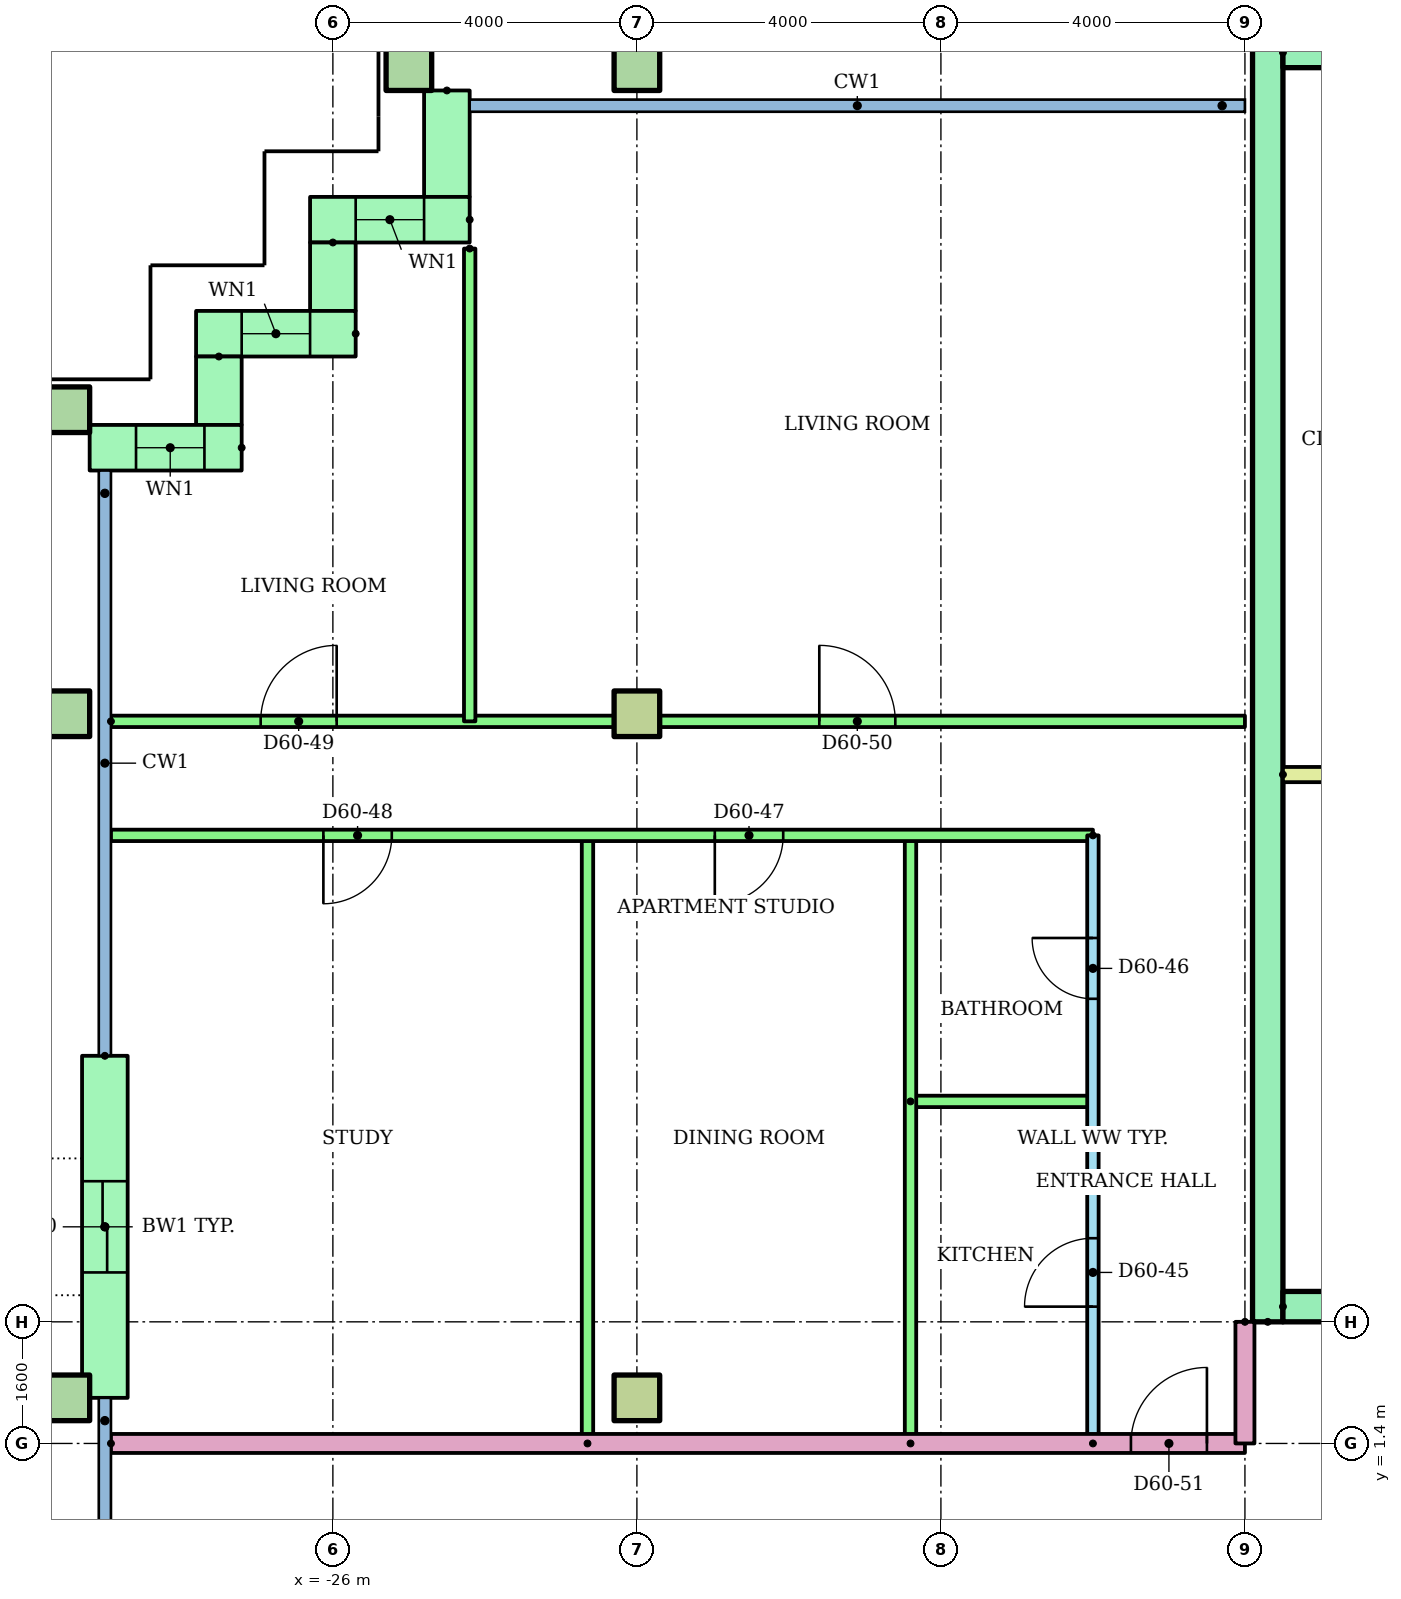
"""IFC4 building model, lengths in metres.
Left out: names, types, materials, properties, quantities, classifications, styles, units other than length and angle.
Written with IfcOpenShell. Run it as: python <this file> out.ifc"""

import sys

from ifc_helpers import new_model, si_unit, direction, frame, frame_2d, origin, origin_2d, place, context, subcontext, project, spatial, rectangle, hollow_rectangle, extrude, element, fill, save


model = new_model("IFC4")
c1 = context("Model", 3, precision=1e-05, world=origin(), true_north=direction((0.0, 1.0)))
c2 = subcontext(c1, "Body", "Model", "MODEL_VIEW")
j1 = project(units=[si_unit("LENGTHUNIT", "METRE"), si_unit("PLANEANGLEUNIT", "RADIAN")], contexts=[c1])
p1 = place(None, origin())
s1 = spatial("IfcSite", under=j1, at=p1, CompositionType="ELEMENT")
p2 = place(p1, origin())
s2 = spatial("IfcBuilding", under=s1, at=p2, CompositionType="ELEMENT")
p3 = place(p2, frame((0.0, 0.0, 230.0)))
s3 = spatial("IfcBuildingStorey", under=s2, at=p3, CompositionType="ELEMENT", Elevation=230.0)
p4 = place(p3, frame((-29.5, 2.0, 0.0)))
e1 = element("IfcColumn", 1, at=p4, inside=s3, PredefinedType="COLUMN", context=c2, shape_type="SweptSolid", body=[
    extrude(hollow_rectangle(XDim=0.6, YDim=0.6, WallThickness=0.03, at=origin_2d()), origin(), (0.0, 0.0, 1.0), 3.2),
])
p5 = place(p3, frame((-22.0, 2.0, 0.0)))
e2 = element("IfcColumn", 2, at=p5, inside=s3, PredefinedType="COLUMN", context=c2, shape_type="SweptSolid", body=[
    extrude(rectangle(XDim=0.6, YDim=0.6, at=origin_2d()), origin(), (0.0, 0.0, 1.0), 3.2),
])
p6 = place(p3, frame((-29.5, 11.0, 0.0)))
e3 = element("IfcColumn", 3, at=p6, inside=s3, PredefinedType="COLUMN", context=c2, shape_type="SweptSolid", body=[
    extrude(hollow_rectangle(XDim=0.6, YDim=0.6, WallThickness=0.03, at=origin_2d()), origin(), (0.0, 0.0, 1.0), 3.2),
])
p7 = place(p3, frame((-22.0, 11.0, 0.0)))
e4 = element("IfcColumn", 4, at=p7, inside=s3, PredefinedType="COLUMN", context=c2, shape_type="SweptSolid", body=[
    extrude(rectangle(XDim=0.6, YDim=0.6, at=origin_2d()), origin(), (0.0, 0.0, 1.0), 3.2),
])
for number, where in (
    (5, (-29.5, 15.0, 0.0)),
    (6, (-25.0, 19.5, 0.0)),
    (7, (-22.0, 19.5, 0.0)),
):
    element("IfcColumn", number, at=place(p3, frame(where)), inside=s3, PredefinedType="COLUMN", context=c2, shape_type="SweptSolid", body=[
        extrude(hollow_rectangle(XDim=0.6, YDim=0.6, WallThickness=0.03, at=origin_2d()), origin(), (0.0, 0.0, 1.0), 3.2),
    ])
p8 = place(p3, frame((-24.5, 19.2, 0.0), z_axis=(0.0, 0.0, 1.0), x_axis=(0.0, -1.0, 0.0)))
e8 = element("IfcWall", 8, at=p8, inside=s3, PredefinedType="STANDARD", context=c2, shape_type="SweptSolid", body=[
    extrude(rectangle(XDim=1.4, YDim=0.6, at=frame_2d((0.7, 0.0))), origin(), (0.0, 0.0, 1.0), 2.92),
])
p9 = place(p3, frame((-24.2, 17.5, 0.0), z_axis=(0.0, 0.0, 1.0), x_axis=(-1.0, 0.0, 0.0)))
e9 = element("IfcWall", 9, at=p9, inside=s3, PredefinedType="STANDARD", context=c2, shape_type="SweptSolid", body=[
    extrude(rectangle(XDim=2.1, YDim=0.6, at=frame_2d((1.05, 0.0))), origin(), (0.0, 0.0, 1.0), 2.92),
])
p10 = place(p9, frame((0.6, 0.0, 0.9)))
e10 = element("IfcOpeningElement", 10, at=p10, cuts=e9, PredefinedType="OPENING", context=c2, shape_type="SweptSolid", body=[
    extrude(rectangle(XDim=0.9, YDim=1.5, at=frame_2d((0.45, 0.75))), frame((0.0, 0.31, 0.0), z_axis=(0.0, -1.0, 0.0), x_axis=(1.0, 0.0, 0.0)), (0.0, 0.0, 1.0), 0.62),
])
p11 = place(p3, frame((-26.0, 17.2, 0.0), z_axis=(0.0, 0.0, 1.0), x_axis=(0.0, -1.0, 0.0)))
e11 = element("IfcWall", 11, at=p11, inside=s3, PredefinedType="STANDARD", context=c2, shape_type="SweptSolid", body=[
    extrude(rectangle(XDim=0.9, YDim=0.6, at=frame_2d((0.45, 0.0))), origin(), (0.0, 0.0, 1.0), 2.92),
])
p12 = place(p3, frame((-25.7, 16.0, 0.0), z_axis=(0.0, 0.0, 1.0), x_axis=(-1.0, 0.0, 0.0)))
e12 = element("IfcWall", 12, at=p12, inside=s3, PredefinedType="STANDARD", context=c2, shape_type="SweptSolid", body=[
    extrude(rectangle(XDim=2.1, YDim=0.6, at=frame_2d((1.05, 0.0))), origin(), (0.0, 0.0, 1.0), 2.92),
])
p13 = place(p12, frame((0.6, 0.0, 0.9)))
e13 = element("IfcOpeningElement", 13, at=p13, cuts=e12, PredefinedType="OPENING", context=c2, shape_type="SweptSolid", body=[
    extrude(rectangle(XDim=0.9, YDim=1.5, at=frame_2d((0.45, 0.75))), frame((0.0, 0.31, 0.0), z_axis=(0.0, -1.0, 0.0), x_axis=(1.0, 0.0, 0.0)), (0.0, 0.0, 1.0), 0.62),
])
p14 = place(p3, frame((-27.5, 15.7, 0.0), z_axis=(0.0, 0.0, 1.0), x_axis=(0.0, -1.0, 0.0)))
e14 = element("IfcWall", 14, at=p14, inside=s3, PredefinedType="STANDARD", context=c2, shape_type="SweptSolid", body=[
    extrude(rectangle(XDim=0.9, YDim=0.6, at=frame_2d((0.45, 0.0))), origin(), (0.0, 0.0, 1.0), 2.92),
])
p15 = place(p3, frame((-27.2, 14.5, 0.0), z_axis=(0.0, 0.0, 1.0), x_axis=(-1.0, 0.0, 0.0)))
e15 = element("IfcWall", 15, at=p15, inside=s3, PredefinedType="STANDARD", context=c2, shape_type="SweptSolid", body=[
    extrude(rectangle(XDim=2.0, YDim=0.6, at=frame_2d((1.0, 0.0))), origin(), (0.0, 0.0, 1.0), 2.92),
])
p16 = place(p15, frame((0.49, 0.0, 0.9)))
e16 = element("IfcOpeningElement", 16, at=p16, cuts=e15, PredefinedType="OPENING", context=c2, shape_type="SweptSolid", body=[
    extrude(rectangle(XDim=0.9, YDim=1.5, at=frame_2d((0.45, 0.75))), frame((0.0, 0.31, 0.0), z_axis=(0.0, -1.0, 0.0), x_axis=(1.0, 0.0, 0.0)), (0.0, 0.0, 1.0), 0.62),
])
p17 = place(p3, frame((-29.0, 6.5, 0.0), z_axis=(0.0, 0.0, 1.0), x_axis=(0.0, -1.0, 0.0)))
e17 = element("IfcWall", 17, at=p17, inside=s3, PredefinedType="STANDARD", context=c2, shape_type="SweptSolid", body=[
    extrude(rectangle(XDim=4.5, YDim=0.6, at=frame_2d((2.25, 0.0))), origin(), (0.0, 0.0, 1.0), 2.92),
])
p18 = place(p17, frame((1.65, 0.0, 0.0)))
e18 = element("IfcOpeningElement", 18, at=p18, cuts=e17, PredefinedType="OPENING", context=c2, shape_type="SweptSolid", body=[
    extrude(rectangle(XDim=1.2, YDim=2.1, at=frame_2d((0.6, 1.05))), frame((0.0, 0.31, 0.0), z_axis=(0.0, -1.0, 0.0), x_axis=(1.0, 0.0, 0.0)), (0.0, 0.0, 1.0), 0.62),
])
p19 = place(p3, frame((-13.7, 3.0, 0.0), z_axis=(0.0, 0.0, 1.0), x_axis=(0.0, 1.0, 0.0)))
e19 = element("IfcWall", 19, at=p19, inside=s3, PredefinedType="SHEAR", context=c2, shape_type="SweptSolid", body=[
    extrude(rectangle(XDim=17.0, YDim=0.4, at=frame_2d((8.5, 0.0))), origin(), (0.0, 0.0, 1.0), 2.92),
])
p20 = place(p3, frame((-13.5, 19.7, 0.0)))
e20 = element("IfcWall", 20, at=p20, inside=s3, PredefinedType="SHEAR", context=c2, shape_type="SweptSolid", body=[
    extrude(rectangle(XDim=27.0, YDim=0.4, at=frame_2d((13.5, 0.0))), origin(), (0.0, 0.0, 1.0), 2.92),
])
p21 = place(p3, frame((-13.5, 3.2, 0.0)))
e21 = element("IfcWall", 21, at=p21, inside=s3, PredefinedType="SHEAR", context=c2, shape_type="SweptSolid", body=[
    extrude(rectangle(XDim=27.0, YDim=0.4, at=frame_2d((13.5, 0.0))), origin(), (0.0, 0.0, 1.0), 2.92),
])
p22 = place(p21, frame((22.083, 0.0, 0.0)))
e22 = element("IfcOpeningElement", 22, at=p22, cuts=e21, PredefinedType="OPENING", context=c2, shape_type="SweptSolid", body=[
    extrude(rectangle(XDim=1.1, YDim=2.1, at=frame_2d((0.55, 1.05))), frame((0.0, 0.21, 0.0), z_axis=(0.0, -1.0, 0.0), x_axis=(1.0, 0.0, 0.0)), (0.0, 0.0, 1.0), 0.42),
])
p23 = place(p21, frame((25.128, 0.0, 0.0)))
e23 = element("IfcOpeningElement", 23, at=p23, cuts=e21, PredefinedType="OPENING", context=c2, shape_type="SweptSolid", body=[
    extrude(rectangle(XDim=1.1, YDim=2.1, at=frame_2d((0.55, 1.05))), frame((0.0, 0.21, 0.0), z_axis=(0.0, -1.0, 0.0), x_axis=(1.0, 0.0, 0.0)), (0.0, 0.0, 1.0), 0.42),
])
p24 = place(p21, frame((12.6, 0.0, 0.0)))
e24 = element("IfcOpeningElement", 24, at=p24, cuts=e21, PredefinedType="OPENING", context=c2, shape_type="SweptSolid", body=[
    extrude(rectangle(XDim=1.8, YDim=2.1, at=frame_2d((0.9, 1.05))), frame((0.0, 0.21, 0.0), z_axis=(0.0, -1.0, 0.0), x_axis=(1.0, 0.0, 0.0)), (0.0, 0.0, 1.0), 0.42),
])
p25 = place(p3, frame((-13.5, 10.2, 0.0)))
e25 = element("IfcWall", 25, at=p25, inside=s3, PredefinedType="PARTITIONING", context=c2, shape_type="SweptSolid", body=[
    extrude(rectangle(XDim=3.9, YDim=0.2, at=frame_2d((1.95, 0.0))), origin(), (0.0, 0.0, 1.0), 2.92),
])
p26 = place(p3, frame((-16.0, 1.4, 0.0), z_axis=(0.0, 0.0, 1.0), x_axis=(0.0, 1.0, 0.0)))
e26 = element("IfcWall", 26, at=p26, inside=s3, PredefinedType="PARTITIONING", context=c2, shape_type="SweptSolid", body=[
    extrude(rectangle(XDim=8.0, YDim=0.15, at=frame_2d((4.0, 0.0))), origin(), (0.0, 0.0, 1.0), 2.4),
])
p27 = place(p26, frame((1.8, 0.0, 0.0)))
e27 = element("IfcOpeningElement", 27, at=p27, cuts=e26, PredefinedType="OPENING", context=c2, shape_type="SweptSolid", body=[
    extrude(rectangle(XDim=0.9, YDim=2.1, at=frame_2d((0.45, 1.05))), frame((0.0, 0.085, 0.0), z_axis=(0.0, -1.0, 0.0), x_axis=(1.0, 0.0, 0.0)), (0.0, 0.0, 1.0), 0.17),
])
p28 = place(p26, frame((5.85, 0.0, 0.0)))
e28 = element("IfcOpeningElement", 28, at=p28, cuts=e26, PredefinedType="OPENING", context=c2, shape_type="SweptSolid", body=[
    extrude(rectangle(XDim=0.8, YDim=2.1, at=frame_2d((0.4, 1.05))), frame((0.0, 0.085, 0.0), z_axis=(0.0, -1.0, 0.0), x_axis=(1.0, 0.0, 0.0)), (0.0, 0.0, 1.0), 0.17),
])
p29 = place(p3, frame((-18.4, 5.9, 0.0)))
e29 = element("IfcWall", 29, at=p29, inside=s3, PredefinedType="PARTITIONING", context=c2, shape_type="SweptSolid", body=[
    extrude(rectangle(XDim=2.4, YDim=0.15, at=frame_2d((1.2, 0.0))), origin(), (0.0, 0.0, 1.0), 2.4),
])
for number, where, z_axis, x_axis in (
    (30, (-18.4, 1.4, 0.0), (0.0, 0.0, 1.0), (0.0, 1.0, 0.0)),
    (31, (-22.65, 1.4, 0.0), (0.0, 0.0, 1.0), (0.0, 1.0, 0.0)),
):
    element("IfcWall", number, at=place(p3, frame(where, z_axis=z_axis, x_axis=x_axis)), inside=s3, PredefinedType="PARTITIONING", context=c2, shape_type="SweptSolid", body=[
        extrude(rectangle(XDim=8.0, YDim=0.15, at=frame_2d((4.0, 0.0))), origin(), (0.0, 0.0, 1.0), 2.4),
    ])
p30 = place(p3, frame((-16.0, 9.4, 0.0), z_axis=(0.0, 0.0, 1.0), x_axis=(-1.0, 0.0, 0.0)))
e32 = element("IfcWall", 32, at=p30, inside=s3, PredefinedType="PARTITIONING", context=c2, shape_type="SweptSolid", body=[
    extrude(rectangle(XDim=12.92, YDim=0.15, at=frame_2d((6.46, 0.0))), origin(), (0.0, 0.0, 1.0), 2.4),
])
p31 = place(p30, frame((4.075, 0.0, 0.0)))
e33 = element("IfcOpeningElement", 33, at=p31, cuts=e32, PredefinedType="OPENING", context=c2, shape_type="SweptSolid", body=[
    extrude(rectangle(XDim=0.9, YDim=2.1, at=frame_2d((0.45, 1.05))), frame((0.0, 0.085, 0.0), z_axis=(0.0, -1.0, 0.0), x_axis=(1.0, 0.0, 0.0)), (0.0, 0.0, 1.0), 0.17),
])
p32 = place(p30, frame((9.225, 0.0, 0.0)))
e34 = element("IfcOpeningElement", 34, at=p32, cuts=e32, PredefinedType="OPENING", context=c2, shape_type="SweptSolid", body=[
    extrude(rectangle(XDim=0.9, YDim=2.1, at=frame_2d((0.45, 1.05))), frame((0.0, 0.085, 0.0), z_axis=(0.0, -1.0, 0.0), x_axis=(1.0, 0.0, 0.0)), (0.0, 0.0, 1.0), 0.17),
])
p33 = place(p3, frame((-28.92, 10.9, 0.0)))
e35 = element("IfcWall", 35, at=p33, inside=s3, PredefinedType="PARTITIONING", context=c2, shape_type="SweptSolid", body=[
    extrude(rectangle(XDim=14.92, YDim=0.15, at=frame_2d((7.46, 0.0))), origin(), (0.0, 0.0, 1.0), 2.4),
])
p34 = place(p33, frame((1.97, 0.0, 0.0)))
e36 = element("IfcOpeningElement", 36, at=p34, cuts=e35, PredefinedType="OPENING", context=c2, shape_type="SweptSolid", body=[
    extrude(rectangle(XDim=1.0, YDim=2.1, at=frame_2d((0.5, 1.05))), frame((0.0, 0.085, 0.0), z_axis=(0.0, -1.0, 0.0), x_axis=(1.0, 0.0, 0.0)), (0.0, 0.0, 1.0), 0.17),
])
p35 = place(p33, frame((9.32, 0.0, 0.0)))
e37 = element("IfcOpeningElement", 37, at=p35, cuts=e35, PredefinedType="OPENING", context=c2, shape_type="SweptSolid", body=[
    extrude(rectangle(XDim=1.0, YDim=2.1, at=frame_2d((0.5, 1.05))), frame((0.0, 0.085, 0.0), z_axis=(0.0, -1.0, 0.0), x_axis=(1.0, 0.0, 0.0)), (0.0, 0.0, 1.0), 0.17),
])
p36 = place(p3, frame((-24.2, 17.12, 0.0), z_axis=(0.0, 0.0, 1.0), x_axis=(0.0, -1.0, 0.0)))
e38 = element("IfcWall", 38, at=p36, inside=s3, PredefinedType="PARTITIONING", context=c2, shape_type="SweptSolid", body=[
    extrude(rectangle(XDim=6.22, YDim=0.15, at=frame_2d((3.11, 0.0))), origin(), (0.0, 0.0, 1.0), 2.4),
])
p37 = place(p3, frame((-28.92, 1.4, 0.0)))
e39 = element("IfcWall", 39, at=p37, inside=s3, PredefinedType="PARTITIONING", context=c2, shape_type="SweptSolid", body=[
    extrude(rectangle(XDim=14.92, YDim=0.25, at=frame_2d((7.46, 0.0))), origin(), (0.0, 0.0, 1.0), 2.4),
])
p38 = place(p37, frame((13.42, 0.0, 0.0)))
e40 = element("IfcOpeningElement", 40, at=p38, cuts=e39, PredefinedType="OPENING", context=c2, shape_type="SweptSolid", body=[
    extrude(rectangle(XDim=1.0, YDim=2.1, at=frame_2d((0.5, 1.05))), frame((0.0, 0.135, 0.0), z_axis=(0.0, -1.0, 0.0), x_axis=(1.0, 0.0, 0.0)), (0.0, 0.0, 1.0), 0.27),
])
p39 = place(p3, frame((-14.0, 3.0, 0.0), z_axis=(0.0, 0.0, 1.0), x_axis=(0.0, -1.0, 0.0)))
e41 = element("IfcWall", 41, at=p39, inside=s3, PredefinedType="PARTITIONING", context=c2, shape_type="SweptSolid", body=[
    extrude(rectangle(XDim=1.6, YDim=0.25, at=frame_2d((0.8, 0.0))), origin(), (0.0, 0.0, 1.0), 2.4),
])
p40 = place(p10, origin())
e42 = element("IfcWindow", 42, at=p40, inside=s3, PartitioningType="SINGLE_PANEL", PredefinedType="WINDOW", context=c2, shape_type="SweptSolid", body=[
    extrude(rectangle(XDim=0.9, YDim=1.5, at=frame_2d((0.45, 0.75))), frame((0.0, 0.03, 0.0), z_axis=(0.0, -1.0, 0.0), x_axis=(1.0, 0.0, 0.0)), (0.0, 0.0, 1.0), 0.06),
])
fill(e10, e42)
p41 = place(p13, origin())
e43 = element("IfcWindow", 43, at=p41, inside=s3, PartitioningType="SINGLE_PANEL", PredefinedType="WINDOW", context=c2, shape_type="SweptSolid", body=[
    extrude(rectangle(XDim=0.9, YDim=1.5, at=frame_2d((0.45, 0.75))), frame((0.0, 0.03, 0.0), z_axis=(0.0, -1.0, 0.0), x_axis=(1.0, 0.0, 0.0)), (0.0, 0.0, 1.0), 0.06),
])
fill(e13, e43)
p42 = place(p16, origin())
e44 = element("IfcWindow", 44, at=p42, inside=s3, PartitioningType="SINGLE_PANEL", PredefinedType="WINDOW", context=c2, shape_type="SweptSolid", body=[
    extrude(rectangle(XDim=0.9, YDim=1.5, at=frame_2d((0.45, 0.75))), frame((0.0, 0.03, 0.0), z_axis=(0.0, -1.0, 0.0), x_axis=(1.0, 0.0, 0.0)), (0.0, 0.0, 1.0), 0.06),
])
fill(e16, e44)
p43 = place(p27, origin())
e45 = element("IfcDoor", 45, at=p43, inside=s3, OperationType="SINGLE_SWING_LEFT", PredefinedType="DOOR", context=c2, shape_type="SweptSolid", body=[
    extrude(rectangle(XDim=0.9, YDim=2.1, at=frame_2d((0.45, 1.05))), frame((0.0, 0.025, 0.0), z_axis=(0.0, -1.0, 0.0), x_axis=(1.0, 0.0, 0.0)), (0.0, 0.0, 1.0), 0.05),
])
fill(e27, e45)
p44 = place(p28, origin())
e46 = element("IfcDoor", 46, at=p44, inside=s3, OperationType="SINGLE_SWING_RIGHT", PredefinedType="DOOR", context=c2, shape_type="SweptSolid", body=[
    extrude(rectangle(XDim=0.8, YDim=2.1, at=frame_2d((0.4, 1.05))), frame((0.0, 0.025, 0.0), z_axis=(0.0, -1.0, 0.0), x_axis=(1.0, 0.0, 0.0)), (0.0, 0.0, 1.0), 0.05),
])
fill(e28, e46)
p45 = place(p31, origin())
e47 = element("IfcDoor", 47, at=p45, inside=s3, OperationType="SINGLE_SWING_RIGHT", PredefinedType="DOOR", context=c2, shape_type="SweptSolid", body=[
    extrude(rectangle(XDim=0.9, YDim=2.1, at=frame_2d((0.45, 1.05))), frame((0.0, 0.025, 0.0), z_axis=(0.0, -1.0, 0.0), x_axis=(1.0, 0.0, 0.0)), (0.0, 0.0, 1.0), 0.05),
])
fill(e33, e47)
p46 = place(p32, origin())
e48 = element("IfcDoor", 48, at=p46, inside=s3, OperationType="SINGLE_SWING_RIGHT", PredefinedType="DOOR", context=c2, shape_type="SweptSolid", body=[
    extrude(rectangle(XDim=0.9, YDim=2.1, at=frame_2d((0.45, 1.05))), frame((0.0, 0.025, 0.0), z_axis=(0.0, -1.0, 0.0), x_axis=(1.0, 0.0, 0.0)), (0.0, 0.0, 1.0), 0.05),
])
fill(e34, e48)
p47 = place(p34, origin())
e49 = element("IfcDoor", 49, at=p47, inside=s3, OperationType="SINGLE_SWING_RIGHT", PredefinedType="DOOR", context=c2, shape_type="SweptSolid", body=[
    extrude(rectangle(XDim=1.0, YDim=2.1, at=frame_2d((0.5, 1.05))), frame((0.0, 0.025, 0.0), z_axis=(0.0, -1.0, 0.0), x_axis=(1.0, 0.0, 0.0)), (0.0, 0.0, 1.0), 0.05),
])
fill(e36, e49)
p48 = place(p35, origin())
e50 = element("IfcDoor", 50, at=p48, inside=s3, OperationType="SINGLE_SWING_LEFT", PredefinedType="DOOR", context=c2, shape_type="SweptSolid", body=[
    extrude(rectangle(XDim=1.0, YDim=2.1, at=frame_2d((0.5, 1.05))), frame((0.0, 0.025, 0.0), z_axis=(0.0, -1.0, 0.0), x_axis=(1.0, 0.0, 0.0)), (0.0, 0.0, 1.0), 0.05),
])
fill(e37, e50)
p49 = place(p38, origin())
e51 = element("IfcDoor", 51, at=p49, inside=s3, OperationType="SINGLE_SWING_RIGHT", PredefinedType="DOOR", context=c2, shape_type="SweptSolid", body=[
    extrude(rectangle(XDim=1.0, YDim=2.1, at=frame_2d((0.5, 1.05))), frame((0.0, 0.025, 0.0), z_axis=(0.0, -1.0, 0.0), x_axis=(1.0, 0.0, 0.0)), (0.0, 0.0, 1.0), 0.05),
])
fill(e40, e51)
p50 = place(p18, origin())
e52 = element("IfcDoor", 52, at=p50, inside=s3, OperationType="SLIDING_TO_LEFT", PredefinedType="DOOR", context=c2, shape_type="SweptSolid", body=[
    extrude(rectangle(XDim=1.2, YDim=2.1, at=frame_2d((0.6, 1.05))), frame((0.0, 0.025, 0.0), z_axis=(0.0, -1.0, 0.0), x_axis=(1.0, 0.0, 0.0)), (0.0, 0.0, 1.0), 0.05),
])
fill(e18, e52)
save(model, sys.argv[1])
